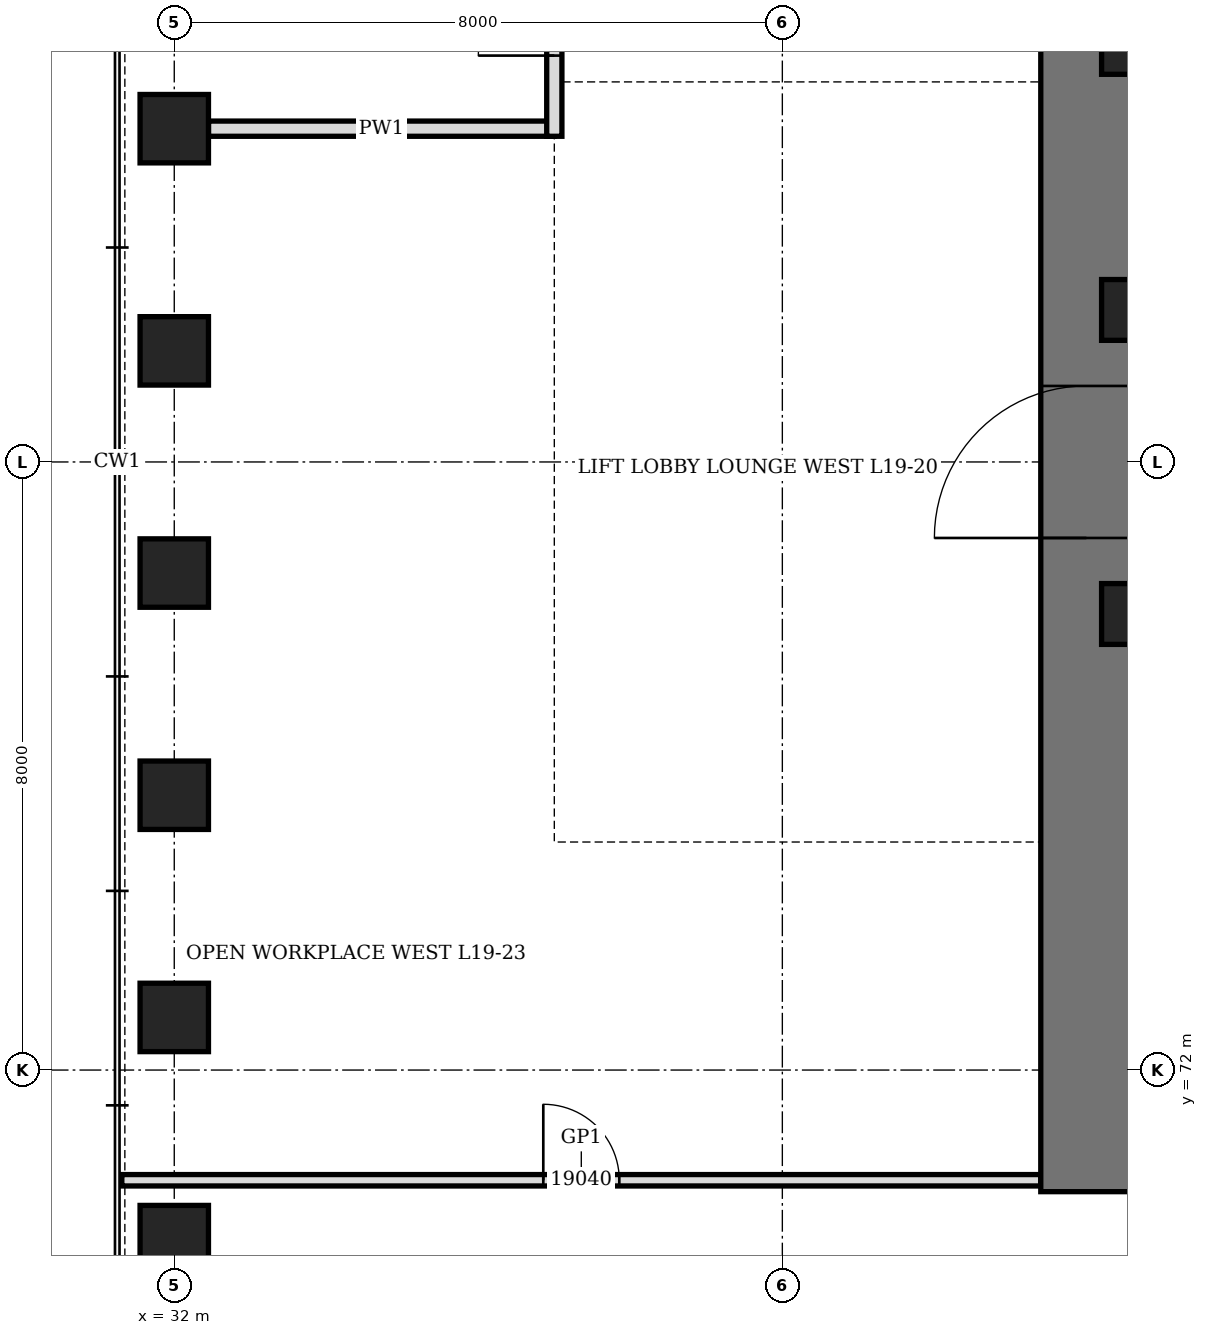
"""IFC4 building model, lengths in metres.
Left out: names, types, materials, properties, quantities, classifications, styles, units other than length and angle.
Written with IfcOpenShell. Run it as: python <this file> out.ifc"""

import sys

from ifc_helpers import new_model, si_unit, direction, frame, frame_2d, origin, origin_2d, place, context, subcontext, project, spatial, rectangle, hollow_rectangle, extrude, element, fill, save


model = new_model("IFC4")
c1 = context("Model", 3, precision=1e-05, world=origin(), true_north=direction((0.0, 1.0)))
c2 = subcontext(c1, "Body", "Model", "MODEL_VIEW")
j1 = project(units=[si_unit("LENGTHUNIT", "METRE"), si_unit("PLANEANGLEUNIT", "RADIAN")], contexts=[c1])
p1 = place(None, origin())
s1 = spatial("IfcSite", under=j1, at=p1, CompositionType="ELEMENT")
p2 = place(p1, origin())
s2 = spatial("IfcBuilding", under=s1, at=p2, CompositionType="ELEMENT")
p3 = place(p2, frame((0.0, 0.0, 89.5)))
s3 = spatial("IfcBuildingStorey", under=s2, at=p3, CompositionType="ELEMENT", Elevation=89.5)
for number, where, z_axis, x_axis in (
    (1, (32.0, 84.385, 0.0), (0.0, 0.0, 1.0), (0.0, 1.0, 0.0)),
    (2, (32.0, 81.461, 0.0), (0.0, 0.0, 1.0), (0.0, 1.0, 0.0)),
    (3, (32.0, 78.539, 0.0), (0.0, 0.0, 1.0), (0.0, 1.0, 0.0)),
    (4, (32.0, 75.615, 0.0), (0.0, 0.0, 1.0), (0.0, 1.0, 0.0)),
    (5, (32.0, 72.692, 0.0), (0.0, 0.0, 1.0), (0.0, 1.0, 0.0)),
    (6, (32.0, 69.769, 0.0), (0.0, 0.0, 1.0), (0.0, 1.0, 0.0)),
):
    element("IfcColumn", number, at=place(p3, frame(where, z_axis=z_axis, x_axis=x_axis)), inside=s3, PredefinedType="COLUMN", context=c2, shape_type="SweptSolid", body=[
        extrude(hollow_rectangle(XDim=0.9, YDim=0.9, WallThickness=0.12, at=origin_2d()), origin(), (0.0, 0.0, 1.0), 4.2),
    ])
p4 = place(p3, frame((44.0, 70.4, 0.0), z_axis=(0.0, 0.0, 1.0), x_axis=(0.0, 1.0, 0.0)))
e7 = element("IfcWall", 7, at=p4, inside=s3, PredefinedType="SHEAR", context=c2, shape_type="SweptSolid", body=[
    extrude(rectangle(XDim=19.2, YDim=1.2, at=frame_2d((9.6, 0.0))), origin(), (0.0, 0.0, 1.0), 4.2),
])
p5 = place(p4, frame((8.6, 0.0, 0.0)))
e8 = element("IfcOpeningElement", 8, at=p5, cuts=e7, PredefinedType="OPENING", context=c2, shape_type="SweptSolid", body=[
    extrude(rectangle(XDim=2.0, YDim=2.4, at=frame_2d((1.0, 1.2))), frame((0.0, 0.61, 0.0), z_axis=(0.0, -1.0, 0.0), x_axis=(1.0, 0.0, 0.0)), (0.0, 0.0, 1.0), 1.22),
])
for number, where, z_axis, x_axis in (
    (9, (44.6, 78.0, 0.0), (0.0, 0.0, 1.0), (1.0, 0.0, 0.0)),
    (10, (44.6, 82.0, 0.0), (0.0, 0.0, 1.0), (1.0, 0.0, 0.0)),
    (11, (44.6, 85.5, 0.0), (0.0, 0.0, 1.0), (1.0, 0.0, 0.0)),
):
    element("IfcColumn", number, at=place(p3, frame(where, z_axis=z_axis, x_axis=x_axis)), inside=s3, PredefinedType="COLUMN", context=c2, shape_type="SweptSolid", body=[
        extrude(hollow_rectangle(XDim=0.8, YDim=0.8, WallThickness=0.1, at=origin_2d()), origin(), (0.0, 0.0, 1.0), 4.2),
    ])
p6 = place(p3, frame((32.45, 84.385, 0.0), z_axis=(0.0, 0.0, 1.0), x_axis=(1.0, 0.0, 0.0)))
e12 = element("IfcWall", 12, at=p6, inside=s3, PredefinedType="PARTITIONING", context=c2, shape_type="SweptSolid", body=[
    extrude(rectangle(XDim=4.55, YDim=0.2, at=frame_2d((2.275, 0.0))), origin(), (0.0, 0.0, 1.0), 3.428),
])
p7 = place(p3, frame((31.31, 70.55, 0.0), z_axis=(0.0, 0.0, 1.0), x_axis=(1.0, 0.0, 0.0)))
e13 = element("IfcWall", 13, at=p7, inside=s3, PredefinedType="PARTITIONING", context=c2, shape_type="SweptSolid", body=[
    extrude(rectangle(XDim=12.09, YDim=0.15, at=frame_2d((6.045, 0.0))), origin(), (0.0, 0.0, 1.0), 4.04),
])
p8 = place(p7, frame((5.545, 0.0, 0.0)))
e14 = element("IfcOpeningElement", 14, at=p8, cuts=e13, PredefinedType="OPENING", context=c2, shape_type="SweptSolid", body=[
    extrude(rectangle(XDim=1.0, YDim=2.4, at=frame_2d((0.5, 1.2))), frame((0.0, 0.085, 0.0), z_axis=(0.0, -1.0, 0.0), x_axis=(1.0, 0.0, 0.0)), (0.0, 0.0, 1.0), 0.17),
])
p9 = place(p3, frame((37.0, 84.285, 0.0), z_axis=(0.0, 0.0, 1.0), x_axis=(0.0, 1.0, 0.0)))
e15 = element("IfcWall", 15, at=p9, inside=s3, PredefinedType="PARTITIONING", context=c2, shape_type="SweptSolid", body=[
    extrude(rectangle(XDim=11.792, YDim=0.2, at=frame_2d((5.896, 0.0))), origin(), (0.0, 0.0, 1.0), 4.04),
])
p10 = place(p9, frame((1.062, 0.0, 0.0)))
e16 = element("IfcOpeningElement", 16, at=p10, cuts=e15, PredefinedType="OPENING", context=c2, shape_type="SweptSolid", body=[
    extrude(rectangle(XDim=1.0, YDim=2.1, at=frame_2d((0.5, 1.05))), frame((0.0, 0.11, 0.0), z_axis=(0.0, -1.0, 0.0), x_axis=(1.0, 0.0, 0.0)), (0.0, 0.0, 1.0), 0.22),
])
p11 = place(p9, frame((6.908, 0.0, 0.0)))
e17 = element("IfcOpeningElement", 17, at=p11, cuts=e15, PredefinedType="OPENING", context=c2, shape_type="SweptSolid", body=[
    extrude(rectangle(XDim=1.0, YDim=2.1, at=frame_2d((0.5, 1.05))), frame((0.0, 0.11, 0.0), z_axis=(0.0, -1.0, 0.0), x_axis=(1.0, 0.0, 0.0)), (0.0, 0.0, 1.0), 0.22),
])
p12 = place(p5, origin())
e18 = element("IfcDoor", 18, at=p12, inside=s3, OperationType="DOUBLE_DOOR_SINGLE_SWING", PredefinedType="DOOR", context=c2, shape_type="SweptSolid", body=[
    extrude(rectangle(XDim=2.0, YDim=2.4, at=frame_2d((1.0, 1.2))), frame((0.0, 0.35, 0.0), z_axis=(0.0, -1.0, 0.0), x_axis=(1.0, 0.0, 0.0)), (0.0, 0.0, 1.0), 0.7),
])
fill(e8, e18)
p13 = place(p10, origin())
e19 = element("IfcDoor", 19, at=p13, inside=s3, OperationType="SINGLE_SWING_LEFT", PredefinedType="DOOR", context=c2, shape_type="SweptSolid", body=[
    extrude(rectangle(XDim=1.0, YDim=2.1, at=frame_2d((0.5, 1.05))), frame((0.0, 0.1, 0.0), z_axis=(0.0, -1.0, 0.0), x_axis=(1.0, 0.0, 0.0)), (0.0, 0.0, 1.0), 0.199),
])
fill(e16, e19)
p14 = place(p8, origin())
e20 = element("IfcDoor", 20, at=p14, inside=s3, OperationType="SINGLE_SWING_RIGHT", PredefinedType="DOOR", context=c2, shape_type="SweptSolid", body=[
    extrude(rectangle(XDim=1.0, YDim=2.4, at=frame_2d((0.5, 1.2))), frame((0.0, 0.075, 0.0), z_axis=(0.0, -1.0, 0.0), x_axis=(1.0, 0.0, 0.0)), (0.0, 0.0, 1.0), 0.149),
])
fill(e14, e20)
save(model, sys.argv[1])
